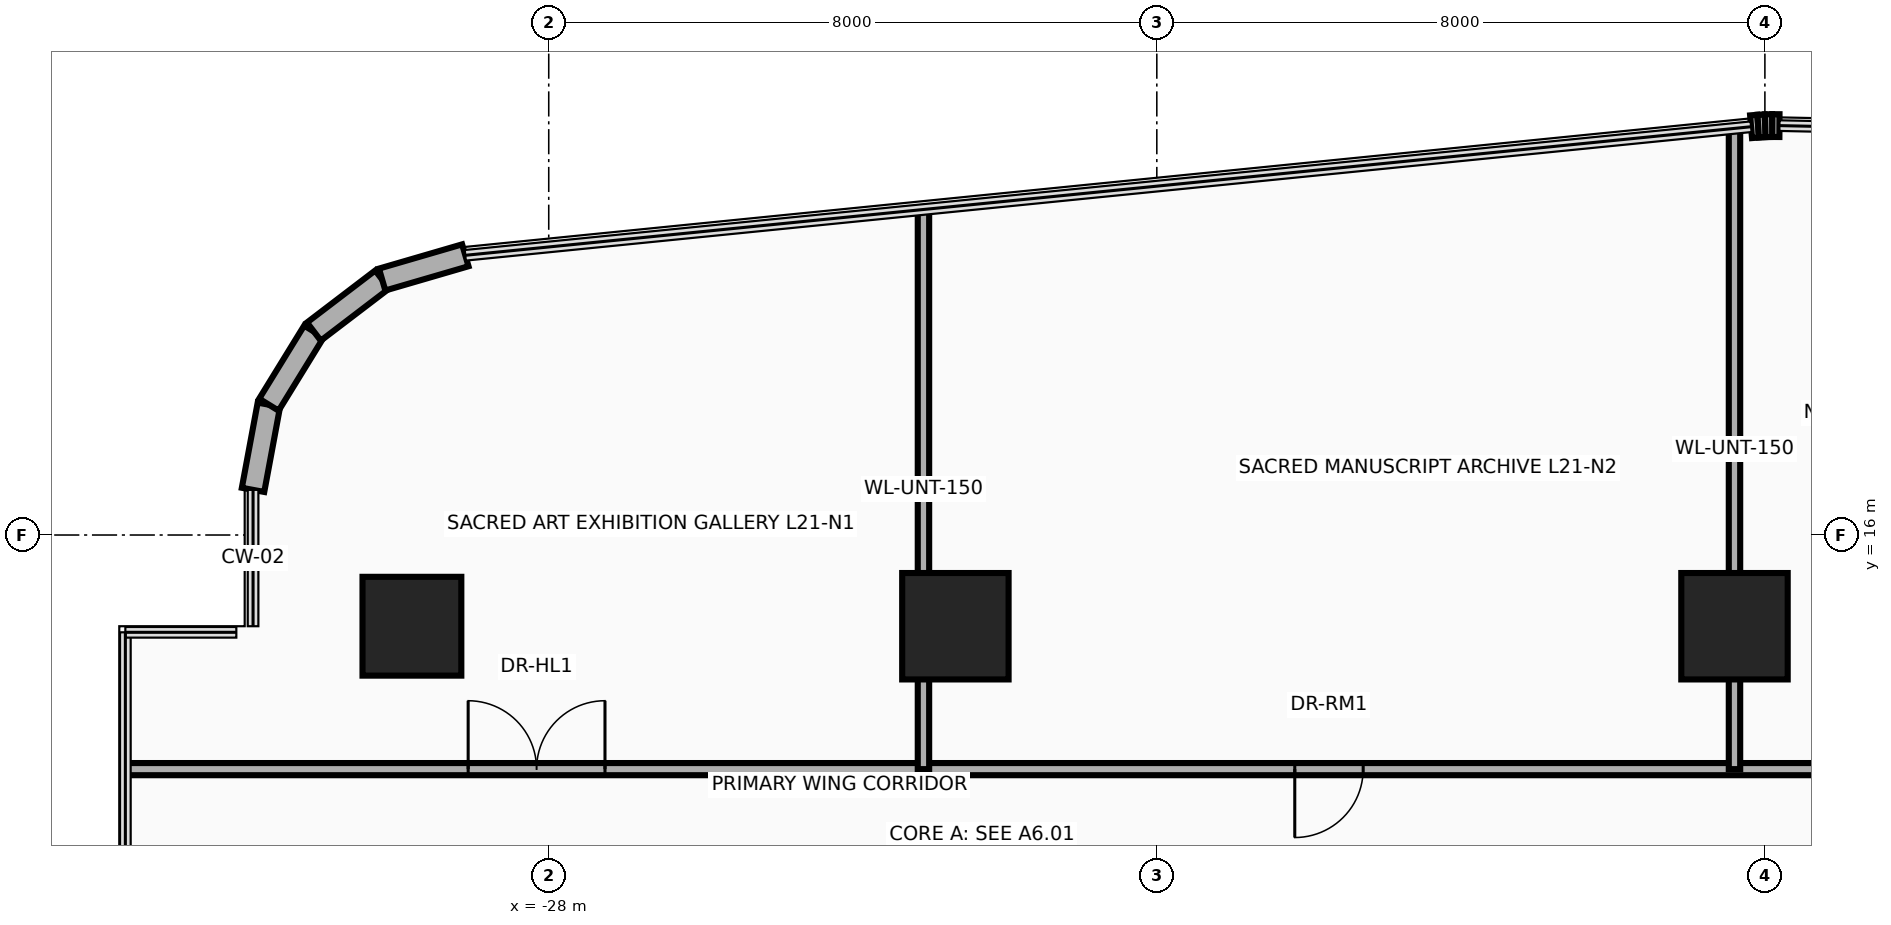
"""IFC4 building model, lengths in metres.
Left out: names, types, materials, properties, quantities, classifications, styles, units other than length and angle.
Written with IfcOpenShell. Run it as: python <this file> out.ifc"""

import sys

from ifc_helpers import new_model, si_unit, direction, frame, frame_2d, origin, origin_2d, place, context, subcontext, project, spatial, rectangle, circle, extrude, source, transform, mapped, element, fill, save


model = new_model("IFC4")
c1 = context("Model", 3, precision=1e-05, world=origin(), true_north=direction((0.0, 1.0)))
c2 = subcontext(c1, "Body", "Model", "MODEL_VIEW")
j1 = project(units=[si_unit("LENGTHUNIT", "METRE"), si_unit("PLANEANGLEUNIT", "RADIAN")], contexts=[c1])
p1 = place(None, origin())
s1 = spatial("IfcSite", under=j1, at=p1, CompositionType="ELEMENT")
p2 = place(p1, origin())
s2 = spatial("IfcBuilding", under=s1, at=p2, CompositionType="ELEMENT")
p3 = place(p2, frame((0.0, 0.0, 85.2)))
s3 = spatial("IfcBuildingStorey", under=s2, at=p3, CompositionType="ELEMENT", Elevation=85.2)
m1 = source(origin(), c2, "Body", "SweptSolid", [
    extrude(circle(Radius=0.65, at=origin_2d()), origin(), (0.0, 0.0, 1.0), 3.7),
])
p4 = place(p3, frame((-29.8, 14.8, 0.0), z_axis=(0.0, 0.0, 1.0), x_axis=(1.0, 0.0, 0.0)))
e1 = element("IfcColumn", 1, at=p4, inside=s3, PredefinedType="COLUMN", context=c2, shape_type="MappedRepresentation", body=[
    mapped(m1, transform((0.0, 0.0, 0.0), x_axis=(1.0, 0.0, 0.0), y_axis=(0.0, 1.0, 0.0), z_axis=(0.0, 0.0, 1.0), scale=1.0)),
])
m2 = source(origin(), c2, "Body", "SweptSolid", [
    extrude(rectangle(XDim=1.4, YDim=1.4, at=origin_2d()), origin(), (0.0, 0.0, 1.0), 3.7),
])
for number, where, z_axis, x_axis in (
    (2, (-22.65, 14.8, 0.0), (0.0, 0.0, 1.0), (1.0, 0.0, 0.0)),
    (3, (-12.4, 14.8, 0.0), (0.0, 0.0, 1.0), (1.0, 0.0, 0.0)),
):
    element("IfcColumn", number, at=place(p3, frame(where, z_axis=z_axis, x_axis=x_axis)), inside=s3, PredefinedType="COLUMN", context=c2, shape_type="MappedRepresentation", body=[
        mapped(m2, transform((0.0, 0.0, 0.0), x_axis=(1.0, 0.0, 0.0), y_axis=(0.0, 1.0, 0.0), z_axis=(0.0, 0.0, 1.0), scale=1.0)),
    ])
p5 = place(p3, frame((-31.89, 16.594, 0.0), z_axis=(0.0, 0.0, 1.0), x_axis=(0.182748995683, 0.9831596028, 0.0)))
e4 = element("IfcWall", 4, at=p5, inside=s3, PredefinedType="SOLIDWALL", context=c2, shape_type="SweptSolid", body=[
    extrude(rectangle(XDim=1.14, YDim=0.3, at=frame_2d((0.57, 0.0))), origin(), (0.0, 0.0, 1.0), 3.46),
])
p6 = place(p3, frame((-31.682, 17.714, 0.0), z_axis=(0.0, 0.0, 1.0), x_axis=(0.524157723014, 0.8516212077, 0.0)))
e5 = element("IfcWall", 5, at=p6, inside=s3, PredefinedType="SOLIDWALL", context=c2, shape_type="SweptSolid", body=[
    extrude(rectangle(XDim=1.129, YDim=0.3, at=frame_2d((0.565, 0.0))), origin(), (0.0, 0.0, 1.0), 3.46),
])
p7 = place(p3, frame((-31.09, 18.676, 0.0), z_axis=(0.0, 0.0, 1.0), x_axis=(0.795253002434, 0.606277710393, 0.0)))
e6 = element("IfcWall", 6, at=p7, inside=s3, PredefinedType="SOLIDWALL", context=c2, shape_type="SweptSolid", body=[
    extrude(rectangle(XDim=1.129, YDim=0.3, at=frame_2d((0.564, 0.0))), origin(), (0.0, 0.0, 1.0), 3.46),
])
p8 = place(p3, frame((-30.192, 19.361, 0.0), z_axis=(0.0, 0.0, 1.0), x_axis=(0.960071941549, 0.279753225271, 0.0)))
e7 = element("IfcWall", 7, at=p8, inside=s3, PredefinedType="SOLIDWALL", context=c2, shape_type="SweptSolid", body=[
    extrude(rectangle(XDim=1.14, YDim=0.3, at=frame_2d((0.57, 0.0))), origin(), (0.0, 0.0, 1.0), 3.46),
])
p9 = place(p3, frame((-12.182, 21.371, 0.0), z_axis=(0.0, 0.0, 1.0), x_axis=(0.996527790842, 0.08326080759, 0.0)))
e8 = element("IfcWall", 8, at=p9, inside=s3, PredefinedType="SOLIDWALL", context=c2, shape_type="SweptSolid", body=[
    extrude(rectangle(XDim=0.094, YDim=0.3, at=frame_2d((0.047, 0.0))), origin(), (0.0, 0.0, 1.0), 3.46),
])
p10 = place(p3, frame((-12.088, 21.379, 0.0), z_axis=(0.0, 0.0, 1.0), x_axis=(0.998476480444, 0.055178963393, 0.0)))
e9 = element("IfcWall", 9, at=p10, inside=s3, PredefinedType="SOLIDWALL", context=c2, shape_type="SweptSolid", body=[
    extrude(rectangle(XDim=0.093, YDim=0.3, at=frame_2d((0.046, 0.0))), origin(), (0.0, 0.0, 1.0), 3.46),
])
p11 = place(p3, frame((-11.996, 21.384, 0.0), z_axis=(0.0, 0.0, 1.0), x_axis=(0.999722573757, 0.023553673204, 0.0)))
e10 = element("IfcWall", 10, at=p11, inside=s3, PredefinedType="SOLIDWALL", context=c2, shape_type="SweptSolid", body=[
    extrude(rectangle(XDim=0.093, YDim=0.3, at=frame_2d((0.047, 0.0))), origin(), (0.0, 0.0, 1.0), 3.46),
])
p12 = place(p3, frame((-11.902, 21.386, 0.0), z_axis=(0.0, 0.0, 1.0), x_axis=(0.999986507273, -0.005194735103, 0.0)))
e11 = element("IfcWall", 11, at=p12, inside=s3, PredefinedType="SOLIDWALL", context=c2, shape_type="SweptSolid", body=[
    extrude(rectangle(XDim=0.094, YDim=0.3, at=frame_2d((0.047, 0.0))), origin(), (0.0, 0.0, 1.0), 3.46),
])
p13 = place(p3, frame((-33.54, 12.92, 0.0), z_axis=(0.0, 0.0, 1.0), x_axis=(1.0, 0.0, 0.0)))
e12 = element("IfcWall", 12, at=p13, inside=s3, PredefinedType="PARTITIONING", context=c2, shape_type="SweptSolid", body=[
    extrude(rectangle(XDim=47.09, YDim=0.16, at=frame_2d((23.545, 0.0))), origin(), (0.0, 0.0, 1.0), 2.583),
])
p14 = place(p13, frame((4.48, 0.0, 0.0)))
e13 = element("IfcOpeningElement", 13, at=p14, cuts=e12, PredefinedType="OPENING", context=c2, shape_type="SweptSolid", body=[
    extrude(rectangle(XDim=1.8, YDim=2.15, at=frame_2d((0.9, 1.075))), frame((0.0, 0.095, 0.0), z_axis=(0.0, -1.0, 0.0), x_axis=(1.0, 0.0, 0.0)), (0.0, 0.0, 1.0), 0.19),
])
p15 = place(p13, frame((15.355, 0.0, 0.0)))
e14 = element("IfcOpeningElement", 14, at=p15, cuts=e12, PredefinedType="OPENING", context=c2, shape_type="SweptSolid", body=[
    extrude(rectangle(XDim=0.9, YDim=2.1, at=frame_2d((0.45, 1.05))), frame((0.0, 0.095, 0.0), z_axis=(0.0, -1.0, 0.0), x_axis=(1.0, 0.0, 0.0)), (0.0, 0.0, 1.0), 0.19),
])
p16 = place(p13, frame((23.632, 0.0, 0.0)))
e15 = element("IfcOpeningElement", 15, at=p16, cuts=e12, PredefinedType="OPENING", context=c2, shape_type="SweptSolid", body=[
    extrude(rectangle(XDim=0.95, YDim=2.15, at=frame_2d((0.475, 1.075))), frame((0.0, 0.095, 0.0), z_axis=(0.0, -1.0, 0.0), x_axis=(1.0, 0.0, 0.0)), (0.0, 0.0, 1.0), 0.19),
])
p17 = place(p13, frame((36.28, 0.0, 0.0)))
e16 = element("IfcOpeningElement", 16, at=p17, cuts=e12, PredefinedType="OPENING", context=c2, shape_type="SweptSolid", body=[
    extrude(rectangle(XDim=0.95, YDim=2.15, at=frame_2d((0.475, 1.075))), frame((0.0, 0.095, 0.0), z_axis=(0.0, -1.0, 0.0), x_axis=(1.0, 0.0, 0.0)), (0.0, 0.0, 1.0), 0.19),
])
p18 = place(p3, frame((-12.4, 12.92, 0.0), z_axis=(0.0, 0.0, 1.0), x_axis=(0.0, 1.0, 0.0)))
e17 = element("IfcWall", 17, at=p18, inside=s3, PredefinedType="PARTITIONING", context=c2, shape_type="SweptSolid", body=[
    extrude(rectangle(XDim=8.43, YDim=0.15, at=frame_2d((4.215, 0.0))), origin(), (0.0, 0.0, 1.0), 2.583),
])
p19 = place(p3, frame((-23.07, 12.92, 0.0), z_axis=(0.0, 0.0, 1.0), x_axis=(0.0, 1.0, 0.0)))
e18 = element("IfcWall", 18, at=p19, inside=s3, PredefinedType="PARTITIONING", context=c2, shape_type="SweptSolid", body=[
    extrude(rectangle(XDim=7.363, YDim=0.15, at=frame_2d((3.681, 0.0))), origin(), (0.0, 0.0, 1.0), 2.583),
])
p20 = place(p14, origin())
e19 = element("IfcDoor", 19, at=p20, inside=s3, OperationType="DOUBLE_DOOR_SINGLE_SWING", PredefinedType="DOOR", context=c2, shape_type="SweptSolid", body=[
    extrude(rectangle(XDim=1.8, YDim=2.15, at=frame_2d((0.9, 1.075))), frame((0.0, 0.025, 0.0), z_axis=(0.0, -1.0, 0.0), x_axis=(1.0, 0.0, 0.0)), (0.0, 0.0, 1.0), 0.05),
])
fill(e13, e19)
p21 = place(p15, frame((0.9, 0.0, 0.0), z_axis=(0.0, 0.0, 1.0), x_axis=(-1.0, 0.0, 0.0)))
e20 = element("IfcDoor", 20, at=p21, inside=s3, OperationType="SINGLE_SWING_LEFT", PredefinedType="DOOR", context=c2, shape_type="SweptSolid", body=[
    extrude(rectangle(XDim=0.9, YDim=2.1, at=frame_2d((0.45, 1.05))), frame((0.0, 0.025, 0.0), z_axis=(0.0, -1.0, 0.0), x_axis=(1.0, 0.0, 0.0)), (0.0, 0.0, 1.0), 0.05),
])
fill(e14, e20)
save(model, sys.argv[1])
